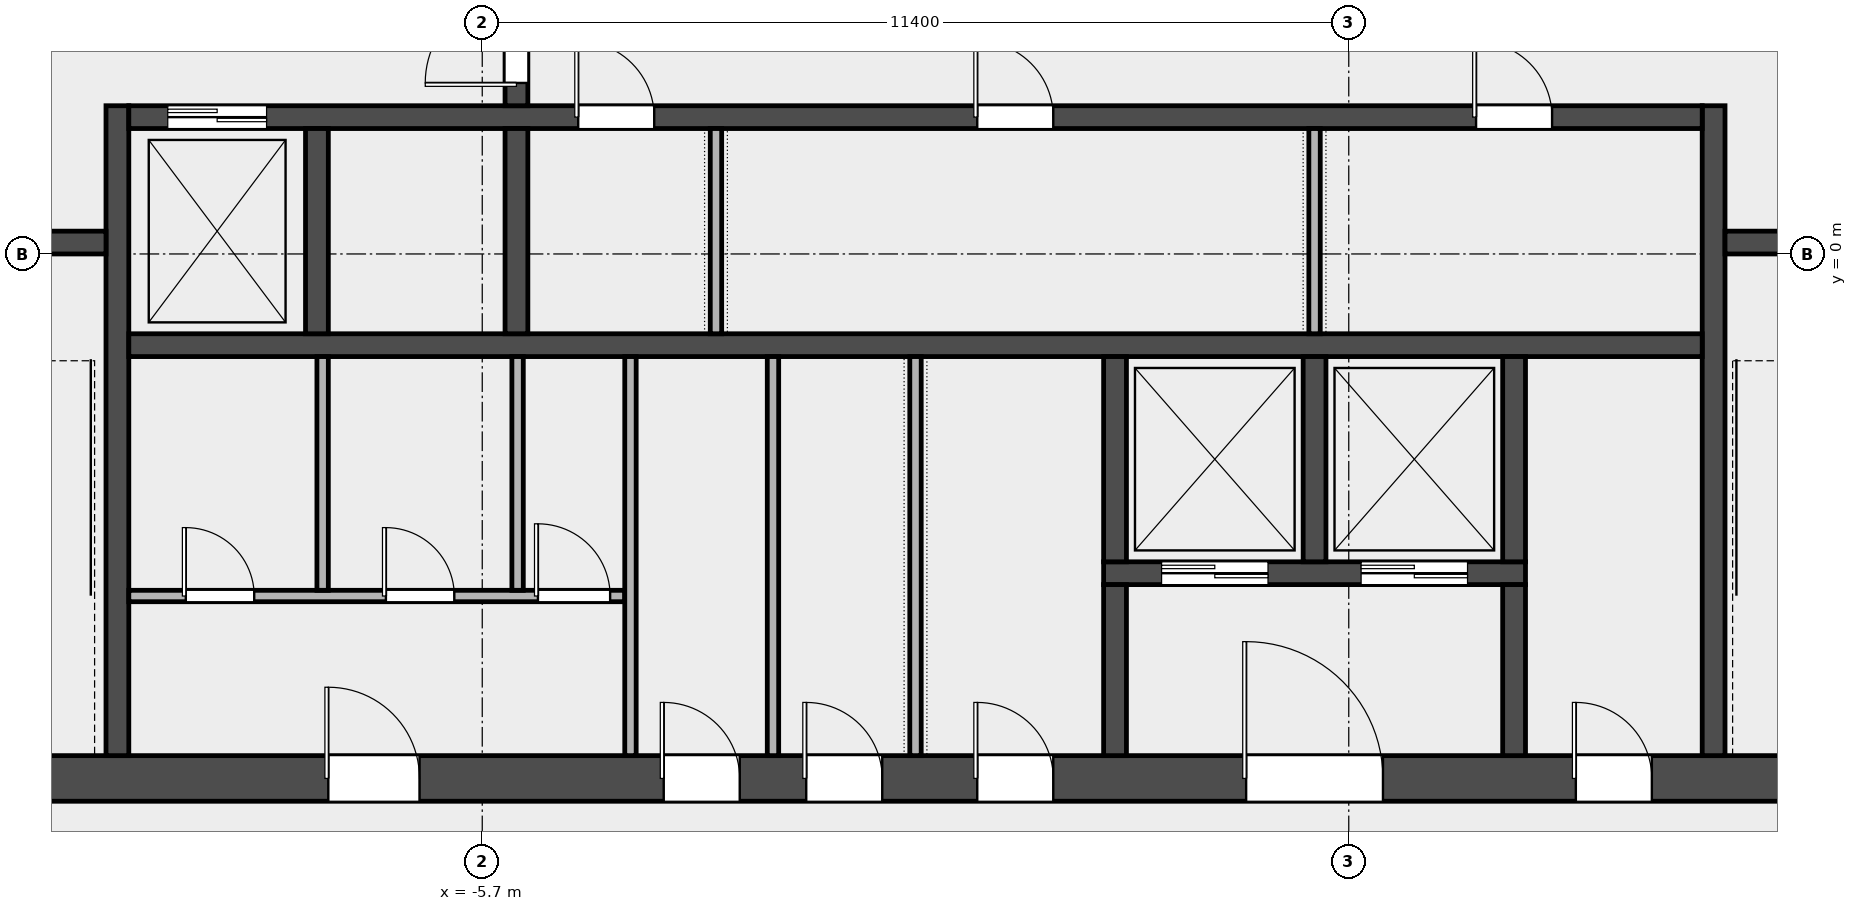
"""IFC4 building model, lengths in metres.
Left out: names, types, materials, properties, quantities, classifications, styles, units other than length and angle.
Written with IfcOpenShell. Run it as: python <this file> out.ifc"""

import sys

from ifc_helpers import new_model, si_unit, direction, frame, frame_2d, origin, place, context, subcontext, project, spatial, rectangle, extrude, element, fill, save


model = new_model("IFC4")
c1 = context("Model", 3, precision=1e-05, world=origin(), true_north=direction((0.0, 1.0)))
c2 = subcontext(c1, "Body", "Model", "MODEL_VIEW")
j1 = project(units=[si_unit("LENGTHUNIT", "METRE"), si_unit("PLANEANGLEUNIT", "RADIAN")], contexts=[c1])
p1 = place(None, origin())
s1 = spatial("IfcSite", under=j1, at=p1, CompositionType="ELEMENT")
p2 = place(p1, origin())
s2 = spatial("IfcBuilding", under=s1, at=p2, CompositionType="ELEMENT")
p3 = place(p2, frame((0.0, 0.0, 345.4)))
s3 = spatial("IfcBuildingStorey", under=s2, at=p3, CompositionType="ELEMENT", Elevation=345.4)
p4 = place(p3, frame((-14.4, -6.9, 0.0), z_axis=(0.0, 0.0, 1.0), x_axis=(1.0, 0.0, 0.0)))
e1 = element("IfcWall", 1, at=p4, inside=s3, PredefinedType="SHEAR", context=c2, shape_type="SweptSolid", body=[
    extrude(rectangle(XDim=28.8, YDim=0.6, at=frame_2d((14.4, 0.0))), origin(), (0.0, 0.0, 1.0), 3.7),
])
p5 = place(p4, frame((6.675, 0.0, 0.0)))
e2 = element("IfcOpeningElement", 2, at=p5, cuts=e1, PredefinedType="OPENING", context=c2, shape_type="SweptSolid", body=[
    extrude(rectangle(XDim=1.2, YDim=2.1, at=frame_2d((0.6, 1.05))), frame((0.0, 0.312, 0.0), z_axis=(0.0, -1.0, 0.0), x_axis=(1.0, 0.0, 0.0)), (0.0, 0.0, 1.0), 0.624),
])
p6 = place(p4, frame((11.087, 0.0, 0.0)))
e3 = element("IfcOpeningElement", 3, at=p6, cuts=e1, PredefinedType="OPENING", context=c2, shape_type="SweptSolid", body=[
    extrude(rectangle(XDim=1.0, YDim=2.1, at=frame_2d((0.5, 1.05))), frame((0.0, 0.312, 0.0), z_axis=(0.0, -1.0, 0.0), x_axis=(1.0, 0.0, 0.0)), (0.0, 0.0, 1.0), 0.624),
])
p7 = place(p4, frame((12.962, 0.0, 0.0)))
e4 = element("IfcOpeningElement", 4, at=p7, cuts=e1, PredefinedType="OPENING", context=c2, shape_type="SweptSolid", body=[
    extrude(rectangle(XDim=1.0, YDim=2.1, at=frame_2d((0.5, 1.05))), frame((0.0, 0.312, 0.0), z_axis=(0.0, -1.0, 0.0), x_axis=(1.0, 0.0, 0.0)), (0.0, 0.0, 1.0), 0.624),
])
p8 = place(p4, frame((15.212, 0.0, 0.0)))
e5 = element("IfcOpeningElement", 5, at=p8, cuts=e1, PredefinedType="OPENING", context=c2, shape_type="SweptSolid", body=[
    extrude(rectangle(XDim=1.0, YDim=2.1, at=frame_2d((0.5, 1.05))), frame((0.0, 0.312, 0.0), z_axis=(0.0, -1.0, 0.0), x_axis=(1.0, 0.0, 0.0)), (0.0, 0.0, 1.0), 0.624),
])
p9 = place(p4, frame((18.75, 0.0, 0.0)))
e6 = element("IfcOpeningElement", 6, at=p9, cuts=e1, PredefinedType="OPENING", context=c2, shape_type="SweptSolid", body=[
    extrude(rectangle(XDim=1.8, YDim=2.1, at=frame_2d((0.9, 1.05))), frame((0.0, 0.312, 0.0), z_axis=(0.0, -1.0, 0.0), x_axis=(1.0, 0.0, 0.0)), (0.0, 0.0, 1.0), 0.624),
])
p10 = place(p4, frame((23.087, 0.0, 0.0)))
e7 = element("IfcOpeningElement", 7, at=p10, cuts=e1, PredefinedType="OPENING", context=c2, shape_type="SweptSolid", body=[
    extrude(rectangle(XDim=1.0, YDim=2.1, at=frame_2d((0.5, 1.05))), frame((0.0, 0.312, 0.0), z_axis=(0.0, -1.0, 0.0), x_axis=(1.0, 0.0, 0.0)), (0.0, 0.0, 1.0), 0.624),
])
for number, where, z_axis, x_axis in (
    (8, (-10.5, -6.6, 0.0), (0.0, 0.0, 1.0), (0.0, 1.0, 0.0)),
    (9, (10.5, -6.6, 0.0), (0.0, 0.0, 1.0), (0.0, 1.0, 0.0)),
):
    element("IfcWall", number, at=place(p3, frame(where, z_axis=z_axis, x_axis=x_axis)), inside=s3, PredefinedType="SHEAR", context=c2, shape_type="SweptSolid", body=[
        extrude(rectangle(XDim=8.55, YDim=0.3, at=frame_2d((4.275, 0.0))), origin(), (0.0, 0.0, 1.0), 3.7),
    ])
p11 = place(p3, frame((-13.8, 0.15, 0.0), z_axis=(0.0, 0.0, 1.0), x_axis=(1.0, 0.0, 0.0)))
e10 = element("IfcWall", 10, at=p11, inside=s3, PredefinedType="SOLIDWALL", context=c2, shape_type="SweptSolid", body=[
    extrude(rectangle(XDim=3.15, YDim=0.3, at=frame_2d((1.575, 0.0))), origin(), (0.0, 0.0, 1.0), 3.7),
])
p12 = place(p11, frame((0.975, 0.0, 0.0)))
e11 = element("IfcOpeningElement", 11, at=p12, cuts=e10, PredefinedType="OPENING", context=c2, shape_type="SweptSolid", body=[
    extrude(rectangle(XDim=1.1, YDim=2.1, at=frame_2d((0.55, 1.05))), frame((0.0, 0.162, 0.0), z_axis=(0.0, -1.0, 0.0), x_axis=(1.0, 0.0, 0.0)), (0.0, 0.0, 1.0), 0.324),
])
p13 = place(p3, frame((10.65, 0.15, 0.0), z_axis=(0.0, 0.0, 1.0), x_axis=(1.0, 0.0, 0.0)))
e12 = element("IfcWall", 12, at=p13, inside=s3, PredefinedType="SOLIDWALL", context=c2, shape_type="SweptSolid", body=[
    extrude(rectangle(XDim=3.15, YDim=0.3, at=frame_2d((1.575, 0.0))), origin(), (0.0, 0.0, 1.0), 3.7),
])
p14 = place(p13, frame((1.025, 0.0, 0.0)))
e13 = element("IfcOpeningElement", 13, at=p14, cuts=e12, PredefinedType="OPENING", context=c2, shape_type="SweptSolid", body=[
    extrude(rectangle(XDim=1.1, YDim=2.1, at=frame_2d((0.55, 1.05))), frame((0.0, 0.162, 0.0), z_axis=(0.0, -1.0, 0.0), x_axis=(1.0, 0.0, 0.0)), (0.0, 0.0, 1.0), 0.324),
])
p15 = place(p3, frame((-10.35, -1.2, 0.0), z_axis=(0.0, 0.0, 1.0), x_axis=(1.0, 0.0, 0.0)))
e14 = element("IfcWall", 14, at=p15, inside=s3, PredefinedType="SOLIDWALL", context=c2, shape_type="SweptSolid", body=[
    extrude(rectangle(XDim=20.7, YDim=0.3, at=frame_2d((10.35, 0.0))), origin(), (0.0, 0.0, 1.0), 3.7),
])
p16 = place(p3, frame((-10.35, 1.8, 0.0), z_axis=(0.0, 0.0, 1.0), x_axis=(1.0, 0.0, 0.0)))
e15 = element("IfcWall", 15, at=p16, inside=s3, PredefinedType="SOLIDWALL", context=c2, shape_type="SweptSolid", body=[
    extrude(rectangle(XDim=20.7, YDim=0.3, at=frame_2d((10.35, 0.0))), origin(), (0.0, 0.0, 1.0), 3.7),
])
p17 = place(p16, frame((0.512, 0.0, 0.0)))
e16 = element("IfcOpeningElement", 16, at=p17, cuts=e15, PredefinedType="OPENING", context=c2, shape_type="SweptSolid", body=[
    extrude(rectangle(XDim=1.3, YDim=2.1, at=frame_2d((0.65, 1.05))), frame((0.0, 0.162, 0.0), z_axis=(0.0, -1.0, 0.0), x_axis=(1.0, 0.0, 0.0)), (0.0, 0.0, 1.0), 0.324),
])
p18 = place(p16, frame((5.913, 0.0, 0.0)))
e17 = element("IfcOpeningElement", 17, at=p18, cuts=e15, PredefinedType="OPENING", context=c2, shape_type="SweptSolid", body=[
    extrude(rectangle(XDim=1.0, YDim=2.1, at=frame_2d((0.5, 1.05))), frame((0.0, 0.162, 0.0), z_axis=(0.0, -1.0, 0.0), x_axis=(1.0, 0.0, 0.0)), (0.0, 0.0, 1.0), 0.324),
])
p19 = place(p16, frame((11.163, 0.0, 0.0)))
e18 = element("IfcOpeningElement", 18, at=p19, cuts=e15, PredefinedType="OPENING", context=c2, shape_type="SweptSolid", body=[
    extrude(rectangle(XDim=1.0, YDim=2.1, at=frame_2d((0.5, 1.05))), frame((0.0, 0.162, 0.0), z_axis=(0.0, -1.0, 0.0), x_axis=(1.0, 0.0, 0.0)), (0.0, 0.0, 1.0), 0.324),
])
p20 = place(p16, frame((17.725, 0.0, 0.0)))
e19 = element("IfcOpeningElement", 19, at=p20, cuts=e15, PredefinedType="OPENING", context=c2, shape_type="SweptSolid", body=[
    extrude(rectangle(XDim=1.0, YDim=2.1, at=frame_2d((0.5, 1.05))), frame((0.0, 0.162, 0.0), z_axis=(0.0, -1.0, 0.0), x_axis=(1.0, 0.0, 0.0)), (0.0, 0.0, 1.0), 0.324),
])
for number, where, z_axis, x_axis in (
    (20, (-7.875, -1.05, 0.0), (0.0, 0.0, 1.0), (0.0, 1.0, 0.0)),
    (21, (-5.25, -1.05, 0.0), (0.0, 0.0, 1.0), (0.0, 1.0, 0.0)),
):
    element("IfcWall", number, at=place(p3, frame(where, z_axis=z_axis, x_axis=x_axis)), inside=s3, PredefinedType="SOLIDWALL", context=c2, shape_type="SweptSolid", body=[
        extrude(rectangle(XDim=2.7, YDim=0.3, at=frame_2d((1.35, 0.0))), origin(), (0.0, 0.0, 1.0), 3.7),
    ])
p21 = place(p3, frame((-5.25, 1.95, 0.0), z_axis=(0.0, 0.0, 1.0), x_axis=(0.0, 1.0, 0.0)))
e22 = element("IfcWall", 22, at=p21, inside=s3, PredefinedType="SOLIDWALL", context=c2, shape_type="SweptSolid", body=[
    extrude(rectangle(XDim=3.3, YDim=0.3, at=frame_2d((1.65, 0.0))), origin(), (0.0, 0.0, 1.0), 3.7),
])
p22 = place(p21, frame((0.3, 0.0, 0.0)))
e23 = element("IfcOpeningElement", 23, at=p22, cuts=e22, PredefinedType="OPENING", context=c2, shape_type="SweptSolid", body=[
    extrude(rectangle(XDim=1.2, YDim=2.1, at=frame_2d((0.6, 1.05))), frame((0.0, 0.162, 0.0), z_axis=(0.0, -1.0, 0.0), x_axis=(1.0, 0.0, 0.0)), (0.0, 0.0, 1.0), 0.324),
])
p23 = place(p21, frame((1.8, 0.0, 0.0)))
e24 = element("IfcOpeningElement", 24, at=p23, cuts=e22, PredefinedType="OPENING", context=c2, shape_type="SweptSolid", body=[
    extrude(rectangle(XDim=1.2, YDim=2.1, at=frame_2d((0.6, 1.05))), frame((0.0, 0.162, 0.0), z_axis=(0.0, -1.0, 0.0), x_axis=(1.0, 0.0, 0.0)), (0.0, 0.0, 1.0), 0.324),
])
p24 = place(p3, frame((2.475, -4.2, 0.0), z_axis=(0.0, 0.0, 1.0), x_axis=(1.0, 0.0, 0.0)))
e25 = element("IfcWall", 25, at=p24, inside=s3, PredefinedType="SOLIDWALL", context=c2, shape_type="SweptSolid", body=[
    extrude(rectangle(XDim=5.55, YDim=0.3, at=frame_2d((2.775, 0.0))), origin(), (0.0, 0.0, 1.0), 3.7),
])
p25 = place(p24, frame((0.762, 0.0, 0.0)))
e26 = element("IfcOpeningElement", 26, at=p25, cuts=e25, PredefinedType="OPENING", context=c2, shape_type="SweptSolid", body=[
    extrude(rectangle(XDim=1.4, YDim=2.1, at=frame_2d((0.7, 1.05))), frame((0.0, 0.162, 0.0), z_axis=(0.0, -1.0, 0.0), x_axis=(1.0, 0.0, 0.0)), (0.0, 0.0, 1.0), 0.324),
])
p26 = place(p24, frame((3.387, 0.0, 0.0)))
e27 = element("IfcOpeningElement", 27, at=p26, cuts=e25, PredefinedType="OPENING", context=c2, shape_type="SweptSolid", body=[
    extrude(rectangle(XDim=1.4, YDim=2.1, at=frame_2d((0.7, 1.05))), frame((0.0, 0.162, 0.0), z_axis=(0.0, -1.0, 0.0), x_axis=(1.0, 0.0, 0.0)), (0.0, 0.0, 1.0), 0.324),
])
p27 = place(p3, frame((2.625, -4.05, 0.0), z_axis=(0.0, 0.0, 1.0), x_axis=(0.0, 1.0, 0.0)))
e28 = element("IfcWall", 28, at=p27, inside=s3, PredefinedType="SOLIDWALL", context=c2, shape_type="SweptSolid", body=[
    extrude(rectangle(XDim=2.7, YDim=0.3, at=frame_2d((1.35, 0.0))), origin(), (0.0, 0.0, 1.0), 3.7),
])
p28 = place(p3, frame((2.625, -6.6, 0.0), z_axis=(0.0, 0.0, 1.0), x_axis=(0.0, 1.0, 0.0)))
e29 = element("IfcWall", 29, at=p28, inside=s3, PredefinedType="SOLIDWALL", context=c2, shape_type="SweptSolid", body=[
    extrude(rectangle(XDim=2.25, YDim=0.3, at=frame_2d((1.125, 0.0))), origin(), (0.0, 0.0, 1.0), 3.7),
])
for number, where, z_axis, x_axis in (
    (30, (5.25, -4.05, 0.0), (0.0, 0.0, 1.0), (0.0, 1.0, 0.0)),
    (31, (7.875, -4.05, 0.0), (0.0, 0.0, 1.0), (0.0, 1.0, 0.0)),
):
    element("IfcWall", number, at=place(p3, frame(where, z_axis=z_axis, x_axis=x_axis)), inside=s3, PredefinedType="SOLIDWALL", context=c2, shape_type="SweptSolid", body=[
        extrude(rectangle(XDim=2.7, YDim=0.3, at=frame_2d((1.35, 0.0))), origin(), (0.0, 0.0, 1.0), 3.7),
    ])
p29 = place(p3, frame((7.875, -6.6, 0.0), z_axis=(0.0, 0.0, 1.0), x_axis=(0.0, 1.0, 0.0)))
e32 = element("IfcWall", 32, at=p29, inside=s3, PredefinedType="SOLIDWALL", context=c2, shape_type="SweptSolid", body=[
    extrude(rectangle(XDim=2.25, YDim=0.3, at=frame_2d((1.125, 0.0))), origin(), (0.0, 0.0, 1.0), 3.7),
])
p30 = place(p3, frame((-10.35, -4.5, 0.0), z_axis=(0.0, 0.0, 1.0), x_axis=(1.0, 0.0, 0.0)))
e33 = element("IfcWall", 33, at=p30, inside=s3, PredefinedType="PARTITIONING", context=c2, shape_type="SweptSolid", body=[
    extrude(rectangle(XDim=6.525, YDim=0.15, at=frame_2d((3.263, 0.0))), origin(), (0.0, 0.0, 1.0), 3.7),
])
p31 = place(p30, frame((0.75, 0.0, 0.0)))
e34 = element("IfcOpeningElement", 34, at=p31, cuts=e33, PredefinedType="OPENING", context=c2, shape_type="SweptSolid", body=[
    extrude(rectangle(XDim=0.9, YDim=2.1, at=frame_2d((0.45, 1.05))), frame((0.0, 0.087, 0.0), z_axis=(0.0, -1.0, 0.0), x_axis=(1.0, 0.0, 0.0)), (0.0, 0.0, 1.0), 0.174),
])
p32 = place(p30, frame((3.383, 0.0, 0.0)))
e35 = element("IfcOpeningElement", 35, at=p32, cuts=e33, PredefinedType="OPENING", context=c2, shape_type="SweptSolid", body=[
    extrude(rectangle(XDim=0.9, YDim=2.1, at=frame_2d((0.45, 1.05))), frame((0.0, 0.087, 0.0), z_axis=(0.0, -1.0, 0.0), x_axis=(1.0, 0.0, 0.0)), (0.0, 0.0, 1.0), 0.174),
])
p33 = place(p30, frame((5.383, 0.0, 0.0)))
e36 = element("IfcOpeningElement", 36, at=p33, cuts=e33, PredefinedType="OPENING", context=c2, shape_type="SweptSolid", body=[
    extrude(rectangle(XDim=0.95, YDim=2.1, at=frame_2d((0.475, 1.05))), frame((0.0, 0.087, 0.0), z_axis=(0.0, -1.0, 0.0), x_axis=(1.0, 0.0, 0.0)), (0.0, 0.0, 1.0), 0.174),
])
for number, where, z_axis, x_axis in (
    (37, (-7.8, -4.425, 0.0), (0.0, 0.0, 1.0), (0.0, 1.0, 0.0)),
    (38, (-5.235, -4.425, 0.0), (0.0, 0.0, 1.0), (0.0, 1.0, 0.0)),
):
    element("IfcWall", number, at=place(p3, frame(where, z_axis=z_axis, x_axis=x_axis)), inside=s3, PredefinedType="PARTITIONING", context=c2, shape_type="SweptSolid", body=[
        extrude(rectangle(XDim=3.075, YDim=0.15, at=frame_2d((1.538, 0.0))), origin(), (0.0, 0.0, 1.0), 3.7),
    ])
for number, where, z_axis, x_axis in (
    (39, (-3.75, -6.6, 0.0), (0.0, 0.0, 1.0), (0.0, 1.0, 0.0)),
    (40, (-1.875, -6.6, 0.0), (0.0, 0.0, 1.0), (0.0, 1.0, 0.0)),
    (41, (0.0, -6.6, 0.0), (0.0, 0.0, 1.0), (0.0, 1.0, 0.0)),
):
    element("IfcWall", number, at=place(p3, frame(where, z_axis=z_axis, x_axis=x_axis)), inside=s3, PredefinedType="PARTITIONING", context=c2, shape_type="SweptSolid", body=[
        extrude(rectangle(XDim=5.25, YDim=0.15, at=frame_2d((2.625, 0.0))), origin(), (0.0, 0.0, 1.0), 3.7),
    ])
for number, where, z_axis, x_axis in (
    (42, (-2.625, -1.05, 0.0), (0.0, 0.0, 1.0), (0.0, 1.0, 0.0)),
    (43, (5.25, -1.05, 0.0), (0.0, 0.0, 1.0), (0.0, 1.0, 0.0)),
):
    element("IfcWall", number, at=place(p3, frame(where, z_axis=z_axis, x_axis=x_axis)), inside=s3, PredefinedType="PARTITIONING", context=c2, shape_type="SweptSolid", body=[
        extrude(rectangle(XDim=2.7, YDim=0.15, at=frame_2d((1.35, 0.0))), origin(), (0.0, 0.0, 1.0), 3.7),
    ])
p34 = place(p22, origin())
e44 = element("IfcDoor", 44, at=p34, inside=s3, OperationType="SINGLE_SWING_LEFT", PredefinedType="DOOR", context=c2, shape_type="SweptSolid", body=[
    extrude(rectangle(XDim=1.2, YDim=2.1, at=frame_2d((0.6, 1.05))), frame((0.0, 0.025, 0.0), z_axis=(0.0, -1.0, 0.0), x_axis=(1.0, 0.0, 0.0)), (0.0, 0.0, 1.0), 0.05),
])
fill(e23, e44)
p35 = place(p17, origin())
e45 = element("IfcDoor", 45, at=p35, inside=s3, OperationType="DOUBLE_DOOR_SLIDING", PredefinedType="DOOR", context=c2, shape_type="SweptSolid", body=[
    extrude(rectangle(XDim=1.3, YDim=2.1, at=frame_2d((0.65, 1.05))), frame((0.0, 0.025, 0.0), z_axis=(0.0, -1.0, 0.0), x_axis=(1.0, 0.0, 0.0)), (0.0, 0.0, 1.0), 0.05),
])
fill(e16, e45)
p36 = place(p25, origin())
e46 = element("IfcDoor", 46, at=p36, inside=s3, OperationType="DOUBLE_DOOR_SLIDING", PredefinedType="DOOR", context=c2, shape_type="SweptSolid", body=[
    extrude(rectangle(XDim=1.4, YDim=2.1, at=frame_2d((0.7, 1.05))), frame((0.0, 0.025, 0.0), z_axis=(0.0, -1.0, 0.0), x_axis=(1.0, 0.0, 0.0)), (0.0, 0.0, 1.0), 0.05),
])
fill(e26, e46)
p37 = place(p26, origin())
e47 = element("IfcDoor", 47, at=p37, inside=s3, OperationType="DOUBLE_DOOR_SLIDING", PredefinedType="DOOR", context=c2, shape_type="SweptSolid", body=[
    extrude(rectangle(XDim=1.4, YDim=2.1, at=frame_2d((0.7, 1.05))), frame((0.0, 0.025, 0.0), z_axis=(0.0, -1.0, 0.0), x_axis=(1.0, 0.0, 0.0)), (0.0, 0.0, 1.0), 0.05),
])
fill(e27, e47)
p38 = place(p5, origin())
e48 = element("IfcDoor", 48, at=p38, inside=s3, OperationType="SINGLE_SWING_LEFT", PredefinedType="DOOR", context=c2, shape_type="SweptSolid", body=[
    extrude(rectangle(XDim=1.2, YDim=2.1, at=frame_2d((0.6, 1.05))), frame((0.0, 0.025, 0.0), z_axis=(0.0, -1.0, 0.0), x_axis=(1.0, 0.0, 0.0)), (0.0, 0.0, 1.0), 0.05),
])
fill(e2, e48)
p39 = place(p31, origin())
e49 = element("IfcDoor", 49, at=p39, inside=s3, OperationType="SINGLE_SWING_LEFT", PredefinedType="DOOR", context=c2, shape_type="SweptSolid", body=[
    extrude(rectangle(XDim=0.9, YDim=2.1, at=frame_2d((0.45, 1.05))), frame((0.0, 0.025, 0.0), z_axis=(0.0, -1.0, 0.0), x_axis=(1.0, 0.0, 0.0)), (0.0, 0.0, 1.0), 0.05),
])
fill(e34, e49)
p40 = place(p32, origin())
e50 = element("IfcDoor", 50, at=p40, inside=s3, OperationType="SINGLE_SWING_LEFT", PredefinedType="DOOR", context=c2, shape_type="SweptSolid", body=[
    extrude(rectangle(XDim=0.9, YDim=2.1, at=frame_2d((0.45, 1.05))), frame((0.0, 0.025, 0.0), z_axis=(0.0, -1.0, 0.0), x_axis=(1.0, 0.0, 0.0)), (0.0, 0.0, 1.0), 0.05),
])
fill(e35, e50)
p41 = place(p33, origin())
e51 = element("IfcDoor", 51, at=p41, inside=s3, OperationType="SINGLE_SWING_LEFT", PredefinedType="DOOR", context=c2, shape_type="SweptSolid", body=[
    extrude(rectangle(XDim=0.95, YDim=2.1, at=frame_2d((0.475, 1.05))), frame((0.0, 0.025, 0.0), z_axis=(0.0, -1.0, 0.0), x_axis=(1.0, 0.0, 0.0)), (0.0, 0.0, 1.0), 0.05),
])
fill(e36, e51)
p42 = place(p6, origin())
e52 = element("IfcDoor", 52, at=p42, inside=s3, OperationType="SINGLE_SWING_LEFT", PredefinedType="DOOR", context=c2, shape_type="SweptSolid", body=[
    extrude(rectangle(XDim=1.0, YDim=2.1, at=frame_2d((0.5, 1.05))), frame((0.0, 0.025, 0.0), z_axis=(0.0, -1.0, 0.0), x_axis=(1.0, 0.0, 0.0)), (0.0, 0.0, 1.0), 0.05),
])
fill(e3, e52)
p43 = place(p7, origin())
e53 = element("IfcDoor", 53, at=p43, inside=s3, OperationType="SINGLE_SWING_LEFT", PredefinedType="DOOR", context=c2, shape_type="SweptSolid", body=[
    extrude(rectangle(XDim=1.0, YDim=2.1, at=frame_2d((0.5, 1.05))), frame((0.0, 0.025, 0.0), z_axis=(0.0, -1.0, 0.0), x_axis=(1.0, 0.0, 0.0)), (0.0, 0.0, 1.0), 0.05),
])
fill(e4, e53)
p44 = place(p8, origin())
e54 = element("IfcDoor", 54, at=p44, inside=s3, OperationType="SINGLE_SWING_LEFT", PredefinedType="DOOR", context=c2, shape_type="SweptSolid", body=[
    extrude(rectangle(XDim=1.0, YDim=2.1, at=frame_2d((0.5, 1.05))), frame((0.0, 0.025, 0.0), z_axis=(0.0, -1.0, 0.0), x_axis=(1.0, 0.0, 0.0)), (0.0, 0.0, 1.0), 0.05),
])
fill(e5, e54)
p45 = place(p9, origin())
e55 = element("IfcDoor", 55, at=p45, inside=s3, OperationType="DOUBLE_DOOR_SINGLE_SWING", PredefinedType="DOOR", context=c2, shape_type="SweptSolid", body=[
    extrude(rectangle(XDim=1.8, YDim=2.1, at=frame_2d((0.9, 1.05))), frame((0.0, 0.025, 0.0), z_axis=(0.0, -1.0, 0.0), x_axis=(1.0, 0.0, 0.0)), (0.0, 0.0, 1.0), 0.05),
])
fill(e6, e55)
p46 = place(p10, origin())
e56 = element("IfcDoor", 56, at=p46, inside=s3, OperationType="SINGLE_SWING_LEFT", PredefinedType="DOOR", context=c2, shape_type="SweptSolid", body=[
    extrude(rectangle(XDim=1.0, YDim=2.1, at=frame_2d((0.5, 1.05))), frame((0.0, 0.025, 0.0), z_axis=(0.0, -1.0, 0.0), x_axis=(1.0, 0.0, 0.0)), (0.0, 0.0, 1.0), 0.05),
])
fill(e7, e56)
p47 = place(p18, origin())
e57 = element("IfcDoor", 57, at=p47, inside=s3, OperationType="SINGLE_SWING_LEFT", PredefinedType="DOOR", context=c2, shape_type="SweptSolid", body=[
    extrude(rectangle(XDim=1.0, YDim=2.1, at=frame_2d((0.5, 1.05))), frame((0.0, 0.025, 0.0), z_axis=(0.0, -1.0, 0.0), x_axis=(1.0, 0.0, 0.0)), (0.0, 0.0, 1.0), 0.05),
])
fill(e17, e57)
p48 = place(p19, origin())
e58 = element("IfcDoor", 58, at=p48, inside=s3, OperationType="SINGLE_SWING_LEFT", PredefinedType="DOOR", context=c2, shape_type="SweptSolid", body=[
    extrude(rectangle(XDim=1.0, YDim=2.1, at=frame_2d((0.5, 1.05))), frame((0.0, 0.025, 0.0), z_axis=(0.0, -1.0, 0.0), x_axis=(1.0, 0.0, 0.0)), (0.0, 0.0, 1.0), 0.05),
])
fill(e18, e58)
p49 = place(p20, origin())
e59 = element("IfcDoor", 59, at=p49, inside=s3, OperationType="SINGLE_SWING_LEFT", PredefinedType="DOOR", context=c2, shape_type="SweptSolid", body=[
    extrude(rectangle(XDim=1.0, YDim=2.1, at=frame_2d((0.5, 1.05))), frame((0.0, 0.025, 0.0), z_axis=(0.0, -1.0, 0.0), x_axis=(1.0, 0.0, 0.0)), (0.0, 0.0, 1.0), 0.05),
])
fill(e19, e59)
save(model, sys.argv[1])
